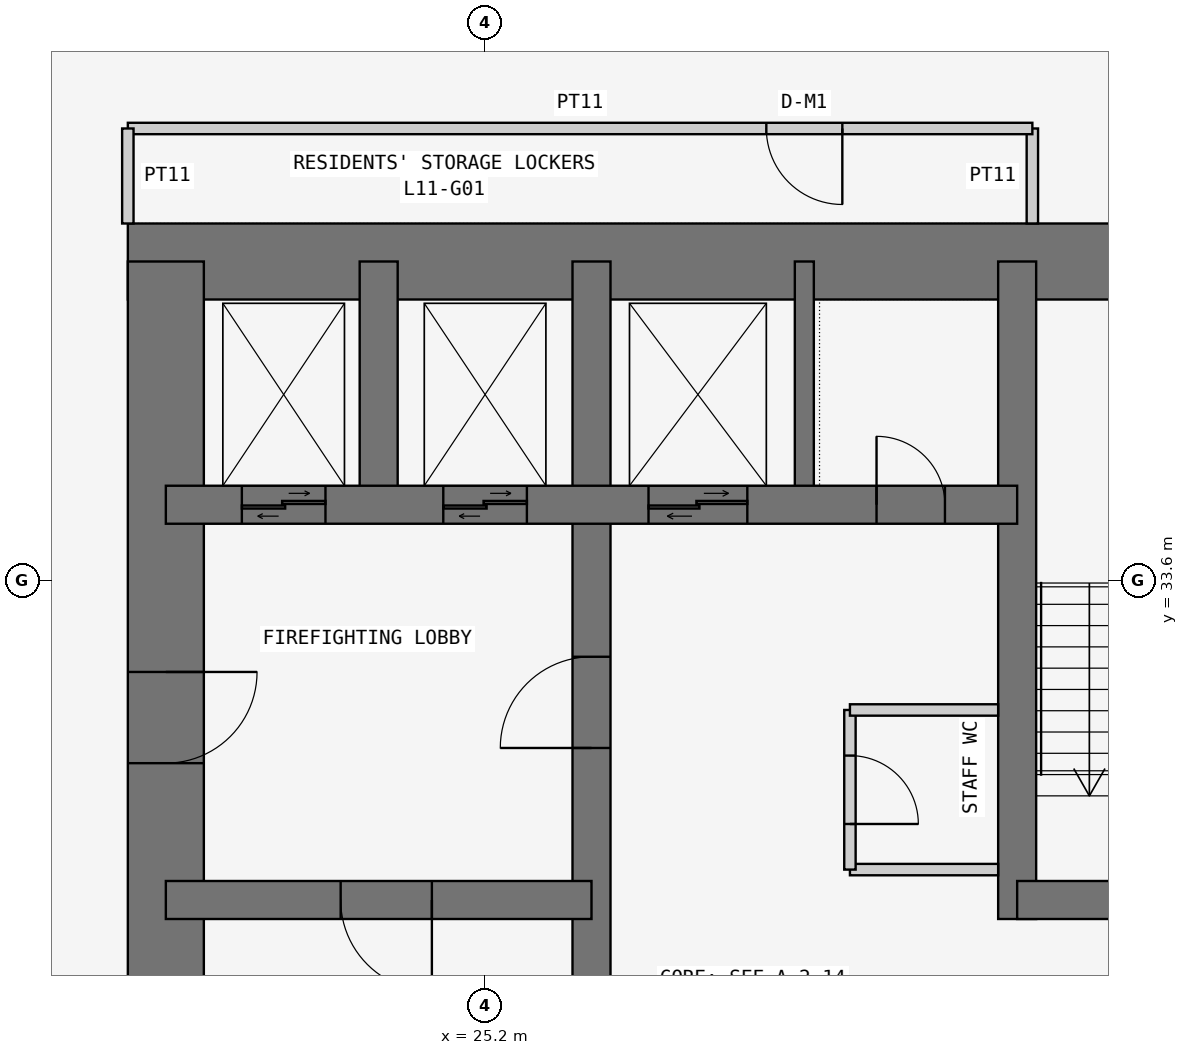
"""IFC4 building model, lengths in metres.
Left out: names, types, materials, properties, quantities, classifications, styles, units other than length and angle.
Written with IfcOpenShell. Run it as: python <this file> out.ifc"""

import sys

from ifc_helpers import new_model, si_unit, direction, frame, frame_2d, origin, place, context, subcontext, project, spatial, rectangle, extrude, element, fill, save


model = new_model("IFC4")
c1 = context("Model", 3, precision=1e-05, world=origin(), true_north=direction((0.0, 1.0)))
c2 = subcontext(c1, "Body", "Model", "MODEL_VIEW")
j1 = project(units=[si_unit("LENGTHUNIT", "METRE"), si_unit("PLANEANGLEUNIT", "RADIAN")], contexts=[c1])
p1 = place(None, origin())
s1 = spatial("IfcSite", under=j1, at=p1, CompositionType="ELEMENT")
p2 = place(p1, origin())
s2 = spatial("IfcBuilding", under=s1, at=p2, CompositionType="ELEMENT")
p3 = place(p2, frame((0.0, 0.0, 48.9)))
s3 = spatial("IfcBuildingStorey", under=s2, at=p3, CompositionType="ELEMENT", Elevation=48.9)
p4 = place(p3, frame((37.8, 37.8, 0.0), z_axis=(0.0, 0.0, 1.0), x_axis=(-1.0, 0.0, 0.0)))
e1 = element("IfcWall", 1, at=p4, inside=s3, PredefinedType="SHEAR", context=c2, shape_type="SweptSolid", body=[
    extrude(rectangle(XDim=17.3, YDim=1.0, at=frame_2d((8.65, 0.0))), origin(), (0.0, 0.0, 1.0), 3.6),
])
p5 = place(p3, frame((21.0, 37.8, 0.0), z_axis=(0.0, 0.0, 1.0), x_axis=(0.0, -1.0, 0.0)))
e2 = element("IfcWall", 2, at=p5, inside=s3, PredefinedType="SHEAR", context=c2, shape_type="SweptSolid", body=[
    extrude(rectangle(XDim=17.3, YDim=1.0, at=frame_2d((8.65, 0.0))), origin(), (0.0, 0.0, 1.0), 3.6),
])
p6 = place(p5, frame((5.4, 0.0, 0.0)))
e3 = element("IfcOpeningElement", 3, at=p6, cuts=e2, PredefinedType="OPENING", context=c2, shape_type="SweptSolid", body=[
    extrude(rectangle(XDim=1.2, YDim=2.1, at=frame_2d((0.6, 1.05))), frame((0.0, 0.51, 0.0), z_axis=(0.0, -1.0, 0.0), x_axis=(1.0, 0.0, 0.0)), (0.0, 0.0, 1.0), 1.02),
])
p7 = place(p3, frame((26.6, 21.0, 0.0), z_axis=(0.0, 0.0, 1.0), x_axis=(0.0, 1.0, 0.0)))
e4 = element("IfcWall", 4, at=p7, inside=s3, PredefinedType="SHEAR", context=c2, shape_type="SweptSolid", body=[
    extrude(rectangle(XDim=16.8, YDim=0.5, at=frame_2d((8.4, 0.0))), origin(), (0.0, 0.0, 1.0), 3.6),
])
p8 = place(p7, frame((10.4, 0.0, 0.0)))
e5 = element("IfcOpeningElement", 5, at=p8, cuts=e4, PredefinedType="OPENING", context=c2, shape_type="SweptSolid", body=[
    extrude(rectangle(XDim=1.2, YDim=2.1, at=frame_2d((0.6, 1.05))), frame((0.0, 0.26, 0.0), z_axis=(0.0, -1.0, 0.0), x_axis=(1.0, 0.0, 0.0)), (0.0, 0.0, 1.0), 0.52),
])
p9 = place(p3, frame((21.0, 29.4, 0.0), z_axis=(0.0, 0.0, 1.0), x_axis=(1.0, 0.0, 0.0)))
e6 = element("IfcWall", 6, at=p9, inside=s3, PredefinedType="SHEAR", context=c2, shape_type="SweptSolid", body=[
    extrude(rectangle(XDim=5.6, YDim=0.5, at=frame_2d((2.8, 0.0))), origin(), (0.0, 0.0, 1.0), 3.6),
])
p10 = place(p9, frame((2.3, 0.0, 0.0)))
e7 = element("IfcOpeningElement", 7, at=p10, cuts=e6, PredefinedType="OPENING", context=c2, shape_type="SweptSolid", body=[
    extrude(rectangle(XDim=1.2, YDim=2.1, at=frame_2d((0.6, 1.05))), frame((0.0, 0.26, 0.0), z_axis=(0.0, -1.0, 0.0), x_axis=(1.0, 0.0, 0.0)), (0.0, 0.0, 1.0), 0.52),
])
p11 = place(p3, frame((21.0, 34.6, 0.0), z_axis=(0.0, 0.0, 1.0), x_axis=(1.0, 0.0, 0.0)))
e8 = element("IfcWall", 8, at=p11, inside=s3, PredefinedType="SHEAR", context=c2, shape_type="SweptSolid", body=[
    extrude(rectangle(XDim=11.2, YDim=0.5, at=frame_2d((5.6, 0.0))), origin(), (0.0, 0.0, 1.0), 3.6),
])
p12 = place(p11, frame((9.35, 0.0, 0.0)))
e9 = element("IfcOpeningElement", 9, at=p12, cuts=e8, PredefinedType="OPENING", context=c2, shape_type="SweptSolid", body=[
    extrude(rectangle(XDim=0.9, YDim=2.1, at=frame_2d((0.45, 1.05))), frame((0.0, 0.26, 0.0), z_axis=(0.0, -1.0, 0.0), x_axis=(1.0, 0.0, 0.0)), (0.0, 0.0, 1.0), 0.52),
])
p13 = place(p11, frame((1.0, 0.0, 0.0)))
e10 = element("IfcOpeningElement", 10, at=p13, cuts=e8, PredefinedType="OPENING", context=c2, shape_type="SweptSolid", body=[
    extrude(rectangle(XDim=1.1, YDim=2.1, at=frame_2d((0.55, 1.05))), frame((0.0, 0.26, 0.0), z_axis=(0.0, -1.0, 0.0), x_axis=(1.0, 0.0, 0.0)), (0.0, 0.0, 1.0), 0.52),
])
p14 = place(p11, frame((3.65, 0.0, 0.0)))
e11 = element("IfcOpeningElement", 11, at=p14, cuts=e8, PredefinedType="OPENING", context=c2, shape_type="SweptSolid", body=[
    extrude(rectangle(XDim=1.1, YDim=2.1, at=frame_2d((0.55, 1.05))), frame((0.0, 0.26, 0.0), z_axis=(0.0, -1.0, 0.0), x_axis=(1.0, 0.0, 0.0)), (0.0, 0.0, 1.0), 0.52),
])
p15 = place(p11, frame((6.35, 0.0, 0.0)))
e12 = element("IfcOpeningElement", 12, at=p15, cuts=e8, PredefinedType="OPENING", context=c2, shape_type="SweptSolid", body=[
    extrude(rectangle(XDim=1.3, YDim=2.1, at=frame_2d((0.65, 1.05))), frame((0.0, 0.26, 0.0), z_axis=(0.0, -1.0, 0.0), x_axis=(1.0, 0.0, 0.0)), (0.0, 0.0, 1.0), 0.52),
])
p16 = place(p3, frame((23.8, 34.6, 0.0), z_axis=(0.0, 0.0, 1.0), x_axis=(0.0, 1.0, 0.0)))
e13 = element("IfcWall", 13, at=p16, inside=s3, PredefinedType="SHEAR", context=c2, shape_type="SweptSolid", body=[
    extrude(rectangle(XDim=3.2, YDim=0.5, at=frame_2d((1.6, 0.0))), origin(), (0.0, 0.0, 1.0), 3.6),
])
p17 = place(p3, frame((32.2, 29.15, 0.0), z_axis=(0.0, 0.0, 1.0), x_axis=(0.0, 1.0, 0.0)))
e14 = element("IfcWall", 14, at=p17, inside=s3, PredefinedType="SHEAR", context=c2, shape_type="SweptSolid", body=[
    extrude(rectangle(XDim=8.65, YDim=0.5, at=frame_2d((4.325, 0.0))), origin(), (0.0, 0.0, 1.0), 3.6),
])
p18 = place(p3, frame((32.2, 29.4, 0.0), z_axis=(0.0, 0.0, 1.0), x_axis=(1.0, 0.0, 0.0)))
e15 = element("IfcWall", 15, at=p18, inside=s3, PredefinedType="SHEAR", context=c2, shape_type="SweptSolid", body=[
    extrude(rectangle(XDim=5.6, YDim=0.5, at=frame_2d((2.8, 0.0))), origin(), (0.0, 0.0, 1.0), 3.6),
])
p19 = place(p18, frame((2.0, 0.0, 0.0)))
e16 = element("IfcOpeningElement", 16, at=p19, cuts=e15, PredefinedType="OPENING", context=c2, shape_type="SweptSolid", body=[
    extrude(rectangle(XDim=1.2, YDim=2.1, at=frame_2d((0.6, 1.05))), frame((0.0, 0.26, 0.0), z_axis=(0.0, -1.0, 0.0), x_axis=(1.0, 0.0, 0.0)), (0.0, 0.0, 1.0), 0.52),
])
p20 = place(p3, frame((29.4, 34.6, 0.0), z_axis=(0.0, 0.0, 1.0), x_axis=(0.0, 1.0, 0.0)))
e17 = element("IfcWall", 17, at=p20, inside=s3, PredefinedType="SHEAR", context=c2, shape_type="SweptSolid", body=[
    extrude(rectangle(XDim=3.2, YDim=0.25, at=frame_2d((1.6, 0.0))), origin(), (0.0, 0.0, 1.0), 3.6),
])
p21 = place(p3, frame((32.4, 38.3, 0.0), z_axis=(0.0, 0.0, 1.0), x_axis=(0.0, 1.0, 0.0)))
e18 = element("IfcWall", 18, at=p21, inside=s3, PredefinedType="PARTITIONING", context=c2, shape_type="SweptSolid", body=[
    extrude(rectangle(XDim=1.25, YDim=0.15, at=frame_2d((0.625, 0.0))), origin(), (0.0, 0.0, 1.0), 3.45),
])
p22 = place(p3, frame((32.4, 39.55, 0.0), z_axis=(0.0, 0.0, 1.0), x_axis=(-1.0, 0.0, 0.0)))
e19 = element("IfcWall", 19, at=p22, inside=s3, PredefinedType="PARTITIONING", context=c2, shape_type="SweptSolid", body=[
    extrude(rectangle(XDim=11.9, YDim=0.15, at=frame_2d((5.95, 0.0))), origin(), (0.0, 0.0, 1.0), 3.45),
])
p23 = place(p22, frame((2.5, 0.0, 0.0)))
e20 = element("IfcOpeningElement", 20, at=p23, cuts=e19, PredefinedType="OPENING", context=c2, shape_type="SweptSolid", body=[
    extrude(rectangle(XDim=1.0, YDim=2.1, at=frame_2d((0.5, 1.05))), frame((0.0, 0.085, 0.0), z_axis=(0.0, -1.0, 0.0), x_axis=(1.0, 0.0, 0.0)), (0.0, 0.0, 1.0), 0.17),
])
p24 = place(p3, frame((20.5, 39.55, 0.0), z_axis=(0.0, 0.0, 1.0), x_axis=(0.0, -1.0, 0.0)))
e21 = element("IfcWall", 21, at=p24, inside=s3, PredefinedType="PARTITIONING", context=c2, shape_type="SweptSolid", body=[
    extrude(rectangle(XDim=1.25, YDim=0.15, at=frame_2d((0.625, 0.0))), origin(), (0.0, 0.0, 1.0), 3.45),
])
p25 = place(p3, frame((31.95, 29.8, 0.0), z_axis=(0.0, 0.0, 1.0), x_axis=(-1.0, 0.0, 0.0)))
e22 = element("IfcWall", 22, at=p25, inside=s3, PredefinedType="PARTITIONING", context=c2, shape_type="SweptSolid", body=[
    extrude(rectangle(XDim=1.95, YDim=0.15, at=frame_2d((0.975, 0.0))), origin(), (0.0, 0.0, 1.0), 3.45),
])
p26 = place(p3, frame((30.0, 29.8, 0.0), z_axis=(0.0, 0.0, 1.0), x_axis=(0.0, 1.0, 0.0)))
e23 = element("IfcWall", 23, at=p26, inside=s3, PredefinedType="PARTITIONING", context=c2, shape_type="SweptSolid", body=[
    extrude(rectangle(XDim=2.1, YDim=0.15, at=frame_2d((1.05, 0.0))), origin(), (0.0, 0.0, 1.0), 3.45),
])
p27 = place(p26, frame((0.6, 0.0, 0.0)))
e24 = element("IfcOpeningElement", 24, at=p27, cuts=e23, PredefinedType="OPENING", context=c2, shape_type="SweptSolid", body=[
    extrude(rectangle(XDim=0.9, YDim=2.1, at=frame_2d((0.45, 1.05))), frame((0.0, 0.085, 0.0), z_axis=(0.0, -1.0, 0.0), x_axis=(1.0, 0.0, 0.0)), (0.0, 0.0, 1.0), 0.17),
])
p28 = place(p3, frame((30.0, 31.9, 0.0), z_axis=(0.0, 0.0, 1.0), x_axis=(1.0, 0.0, 0.0)))
e25 = element("IfcWall", 25, at=p28, inside=s3, PredefinedType="PARTITIONING", context=c2, shape_type="SweptSolid", body=[
    extrude(rectangle(XDim=1.95, YDim=0.15, at=frame_2d((0.975, 0.0))), origin(), (0.0, 0.0, 1.0), 3.45),
])
p29 = place(p23, origin())
e26 = element("IfcDoor", 26, at=p29, inside=s3, OperationType="SINGLE_SWING_LEFT", PredefinedType="DOOR", context=c2, shape_type="SweptSolid", body=[
    extrude(rectangle(XDim=1.0, YDim=2.1, at=frame_2d((0.5, 1.05))), frame((0.0, 0.025, 0.0), z_axis=(0.0, -1.0, 0.0), x_axis=(1.0, 0.0, 0.0)), (0.0, 0.0, 1.0), 0.05),
])
fill(e20, e26)
p30 = place(p6, origin())
e27 = element("IfcDoor", 27, at=p30, inside=s3, OperationType="SINGLE_SWING_LEFT", PredefinedType="DOOR", context=c2, shape_type="SweptSolid", body=[
    extrude(rectangle(XDim=1.2, YDim=2.1, at=frame_2d((0.6, 1.05))), frame((0.0, 0.025, 0.0), z_axis=(0.0, -1.0, 0.0), x_axis=(1.0, 0.0, 0.0)), (0.0, 0.0, 1.0), 0.05),
])
fill(e3, e27)
p31 = place(p10, frame((1.2, 0.0, 0.0), z_axis=(0.0, 0.0, 1.0), x_axis=(-1.0, 0.0, 0.0)))
e28 = element("IfcDoor", 28, at=p31, inside=s3, OperationType="SINGLE_SWING_LEFT", PredefinedType="DOOR", context=c2, shape_type="SweptSolid", body=[
    extrude(rectangle(XDim=1.2, YDim=2.1, at=frame_2d((0.6, 1.05))), frame((0.0, 0.025, 0.0), z_axis=(0.0, -1.0, 0.0), x_axis=(1.0, 0.0, 0.0)), (0.0, 0.0, 1.0), 0.05),
])
fill(e7, e28)
p32 = place(p8, origin())
e29 = element("IfcDoor", 29, at=p32, inside=s3, OperationType="SINGLE_SWING_LEFT", PredefinedType="DOOR", context=c2, shape_type="SweptSolid", body=[
    extrude(rectangle(XDim=1.2, YDim=2.1, at=frame_2d((0.6, 1.05))), frame((0.0, 0.025, 0.0), z_axis=(0.0, -1.0, 0.0), x_axis=(1.0, 0.0, 0.0)), (0.0, 0.0, 1.0), 0.05),
])
fill(e5, e29)
p33 = place(p12, origin())
e30 = element("IfcDoor", 30, at=p33, inside=s3, OperationType="SINGLE_SWING_LEFT", PredefinedType="DOOR", context=c2, shape_type="SweptSolid", body=[
    extrude(rectangle(XDim=0.9, YDim=2.1, at=frame_2d((0.45, 1.05))), frame((0.0, 0.025, 0.0), z_axis=(0.0, -1.0, 0.0), x_axis=(1.0, 0.0, 0.0)), (0.0, 0.0, 1.0), 0.05),
])
fill(e9, e30)
p34 = place(p27, frame((0.9, 0.0, 0.0), z_axis=(0.0, 0.0, 1.0), x_axis=(-1.0, 0.0, 0.0)))
e31 = element("IfcDoor", 31, at=p34, inside=s3, OperationType="SINGLE_SWING_RIGHT", PredefinedType="DOOR", context=c2, shape_type="SweptSolid", body=[
    extrude(rectangle(XDim=0.9, YDim=2.1, at=frame_2d((0.45, 1.05))), frame((0.0, 0.025, 0.0), z_axis=(0.0, -1.0, 0.0), x_axis=(1.0, 0.0, 0.0)), (0.0, 0.0, 1.0), 0.05),
])
fill(e24, e31)
p35 = place(p13, origin())
e32 = element("IfcDoor", 32, at=p35, inside=s3, OperationType="DOUBLE_DOOR_SLIDING", PredefinedType="DOOR", context=c2, shape_type="SweptSolid", body=[
    extrude(rectangle(XDim=1.1, YDim=2.1, at=frame_2d((0.55, 1.05))), frame((0.0, 0.025, 0.0), z_axis=(0.0, -1.0, 0.0), x_axis=(1.0, 0.0, 0.0)), (0.0, 0.0, 1.0), 0.05),
])
fill(e10, e32)
p36 = place(p14, origin())
e33 = element("IfcDoor", 33, at=p36, inside=s3, OperationType="DOUBLE_DOOR_SLIDING", PredefinedType="DOOR", context=c2, shape_type="SweptSolid", body=[
    extrude(rectangle(XDim=1.1, YDim=2.1, at=frame_2d((0.55, 1.05))), frame((0.0, 0.025, 0.0), z_axis=(0.0, -1.0, 0.0), x_axis=(1.0, 0.0, 0.0)), (0.0, 0.0, 1.0), 0.05),
])
fill(e11, e33)
p37 = place(p15, origin())
e34 = element("IfcDoor", 34, at=p37, inside=s3, OperationType="DOUBLE_DOOR_SLIDING", PredefinedType="DOOR", context=c2, shape_type="SweptSolid", body=[
    extrude(rectangle(XDim=1.3, YDim=2.1, at=frame_2d((0.65, 1.05))), frame((0.0, 0.025, 0.0), z_axis=(0.0, -1.0, 0.0), x_axis=(1.0, 0.0, 0.0)), (0.0, 0.0, 1.0), 0.05),
])
fill(e12, e34)
save(model, sys.argv[1])
